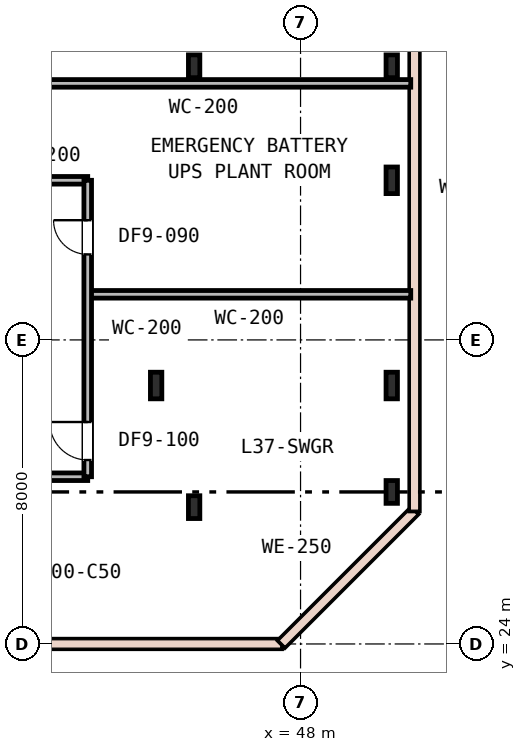
"""IFC4 building model, lengths in metres.
Left out: names, types, materials, properties, quantities, classifications, styles, units other than length and angle.
Written with IfcOpenShell. Run it as: python <this file> out.ifc"""

import sys

from ifc_helpers import new_model, si_unit, direction, frame, frame_2d, origin, origin_2d, place, context, subcontext, project, spatial, rectangle, i_section, extrude, element, fill, save


model = new_model("IFC4")
c1 = context("Model", 3, precision=1e-05, world=origin(), true_north=direction((0.0, 1.0)))
c2 = subcontext(c1, "Body", "Model", "MODEL_VIEW")
j1 = project(units=[si_unit("LENGTHUNIT", "METRE"), si_unit("PLANEANGLEUNIT", "RADIAN")], contexts=[c1])
p1 = place(None, origin())
s1 = spatial("IfcSite", under=j1, at=p1, CompositionType="ELEMENT")
p2 = place(p1, origin())
s2 = spatial("IfcBuilding", under=s1, at=p2, CompositionType="ELEMENT")
p3 = place(p2, frame((0.0, 0.0, 144.0)))
s3 = spatial("IfcBuildingStorey", under=s2, at=p3, CompositionType="ELEMENT", Elevation=144.0)
for number, where, z_axis, x_axis in (
    (1, (45.2, 27.6, 0.0), (0.0, 0.0, 1.0), (1.0, 0.0, 0.0)),
    (2, (45.2, 39.2, 0.0), (0.0, 0.0, 1.0), (1.0, 0.0, 0.0)),
    (3, (50.4, 28.0, 0.0), (0.0, 0.0, 1.0), (1.0, 0.0, 0.0)),
    (4, (50.4, 39.2, 0.0), (0.0, 0.0, 1.0), (1.0, 0.0, 0.0)),
):
    element("IfcColumn", number, at=place(p3, frame(where, z_axis=z_axis, x_axis=x_axis)), inside=s3, PredefinedType="COLUMN", context=c2, shape_type="SweptSolid", body=[
        extrude(i_section(OverallWidth=0.3, OverallDepth=0.6, WebThickness=0.015, FlangeThickness=0.03, FilletRadius=0.027, at=origin_2d()), origin(), (0.0, 0.0, 1.0), 4.8),
    ])
for number, where, z_axis, x_axis in (
    (5, (44.2, 30.8, 0.0), (0.0, 0.0, 1.0), (1.0, 0.0, 0.0)),
    (6, (50.4, 30.8, 0.0), (0.0, 0.0, 1.0), (1.0, 0.0, 0.0)),
    (7, (50.4, 36.2, 0.0), (0.0, 0.0, 1.0), (1.0, 0.0, 0.0)),
):
    element("IfcColumn", number, at=place(p3, frame(where, z_axis=z_axis, x_axis=x_axis)), inside=s3, PredefinedType="COLUMN", context=c2, shape_type="SweptSolid", body=[
        extrude(i_section(OverallWidth=0.3, OverallDepth=0.7, WebThickness=0.017, FlangeThickness=0.032, FilletRadius=0.027, at=origin_2d()), origin(), (0.0, 0.0, 1.0), 4.8),
    ])
p4 = place(p3, frame((40.1, 24.0, 0.0), z_axis=(0.0, 0.0, 1.0), x_axis=(1.0, 0.0, 0.0)))
e8 = element("IfcWall", 8, at=p4, inside=s3, PredefinedType="STANDARD", context=c2, shape_type="SweptSolid", body=[
    extrude(rectangle(XDim=7.4, YDim=0.25, at=frame_2d((3.7, 0.0))), origin(), (0.0, 0.0, 1.0), 1.15),
])
p5 = place(p3, frame((47.5, 24.0, 0.0), z_axis=(0.0, 0.0, 1.0), x_axis=(0.707106781187, 0.707106781187, 0.0)))
e9 = element("IfcWall", 9, at=p5, inside=s3, PredefinedType="STANDARD", context=c2, shape_type="SweptSolid", body=[
    extrude(rectangle(XDim=4.95, YDim=0.25, at=frame_2d((2.475, 0.0))), origin(), (0.0, 0.0, 1.0), 1.15),
])
p6 = place(p3, frame((51.0, 27.5, 0.0), z_axis=(0.0, 0.0, 1.0), x_axis=(0.0, 1.0, 0.0)))
e10 = element("IfcWall", 10, at=p6, inside=s3, PredefinedType="STANDARD", context=c2, shape_type="SweptSolid", body=[
    extrude(rectangle(XDim=17.0, YDim=0.25, at=frame_2d((8.5, 0.0))), origin(), (0.0, 0.0, 1.0), 1.15),
])
p7 = place(p3, frame((40.0, 38.75, 0.0), z_axis=(0.0, 0.0, 1.0), x_axis=(1.0, 0.0, 0.0)))
e11 = element("IfcWall", 11, at=p7, inside=s3, PredefinedType="PARTITIONING", context=c2, shape_type="SweptSolid", body=[
    extrude(rectangle(XDim=10.9, YDim=0.2, at=frame_2d((5.45, 0.0))), origin(), (0.0, 0.0, 1.0), 4.02),
])
p8 = place(p3, frame((39.9, 28.4, 0.0), z_axis=(0.0, 0.0, 1.0), x_axis=(1.0, 0.0, 0.0)))
e12 = element("IfcWall", 12, at=p8, inside=s3, PredefinedType="PARTITIONING", context=c2, shape_type="SweptSolid", body=[
    extrude(rectangle(XDim=2.5, YDim=0.2, at=frame_2d((1.25, 0.0))), origin(), (0.0, 0.0, 1.0), 4.02),
])
p9 = place(p3, frame((42.4, 33.2, 0.0), z_axis=(0.0, 0.0, 1.0), x_axis=(1.0, 0.0, 0.0)))
e13 = element("IfcWall", 13, at=p9, inside=s3, PredefinedType="PARTITIONING", context=c2, shape_type="SweptSolid", body=[
    extrude(rectangle(XDim=8.5, YDim=0.2, at=frame_2d((4.25, 0.0))), origin(), (0.0, 0.0, 1.0), 4.02),
])
p10 = place(p3, frame((40.2, 36.2, 0.0), z_axis=(0.0, 0.0, 1.0), x_axis=(1.0, 0.0, 0.0)))
e14 = element("IfcWall", 14, at=p10, inside=s3, PredefinedType="PARTITIONING", context=c2, shape_type="SweptSolid", body=[
    extrude(rectangle(XDim=2.2, YDim=0.2, at=frame_2d((1.1, 0.0))), origin(), (0.0, 0.0, 1.0), 4.02),
])
p11 = place(p3, frame((42.4, 28.4, 0.0), z_axis=(0.0, 0.0, 1.0), x_axis=(0.0, 1.0, 0.0)))
e15 = element("IfcWall", 15, at=p11, inside=s3, PredefinedType="PARTITIONING", context=c2, shape_type="SweptSolid", body=[
    extrude(rectangle(XDim=7.8, YDim=0.2, at=frame_2d((3.9, 0.0))), origin(), (0.0, 0.0, 1.0), 4.02),
])
p12 = place(p11, frame((0.44, 0.0, 0.0)))
e16 = element("IfcOpeningElement", 16, at=p12, cuts=e15, PredefinedType="OPENING", context=c2, shape_type="SweptSolid", body=[
    extrude(rectangle(XDim=1.0, YDim=2.15, at=frame_2d((0.5, 1.075))), frame((0.0, 0.11, 0.0), z_axis=(0.0, -1.0, 0.0), x_axis=(1.0, 0.0, 0.0)), (0.0, 0.0, 1.0), 0.22),
])
p13 = place(p11, frame((5.85, 0.0, 0.0)))
e17 = element("IfcOpeningElement", 17, at=p13, cuts=e15, PredefinedType="OPENING", context=c2, shape_type="SweptSolid", body=[
    extrude(rectangle(XDim=0.9, YDim=2.15, at=frame_2d((0.45, 1.075))), frame((0.0, 0.11, 0.0), z_axis=(0.0, -1.0, 0.0), x_axis=(1.0, 0.0, 0.0)), (0.0, 0.0, 1.0), 0.22),
])
p14 = place(p12, origin())
e18 = element("IfcDoor", 18, at=p14, inside=s3, OperationType="SINGLE_SWING_RIGHT", PredefinedType="DOOR", context=c2, shape_type="SweptSolid", body=[
    extrude(rectangle(XDim=1.0, YDim=2.15, at=frame_2d((0.5, 1.075))), frame((0.0, 0.025, 0.0), z_axis=(0.0, -1.0, 0.0), x_axis=(1.0, 0.0, 0.0)), (0.0, 0.0, 1.0), 0.05),
])
fill(e16, e18)
p15 = place(p13, origin())
e19 = element("IfcDoor", 19, at=p15, inside=s3, OperationType="SINGLE_SWING_RIGHT", PredefinedType="DOOR", context=c2, shape_type="SweptSolid", body=[
    extrude(rectangle(XDim=0.9, YDim=2.15, at=frame_2d((0.45, 1.075))), frame((0.0, 0.025, 0.0), z_axis=(0.0, -1.0, 0.0), x_axis=(1.0, 0.0, 0.0)), (0.0, 0.0, 1.0), 0.05),
])
fill(e17, e19)
save(model, sys.argv[1])
